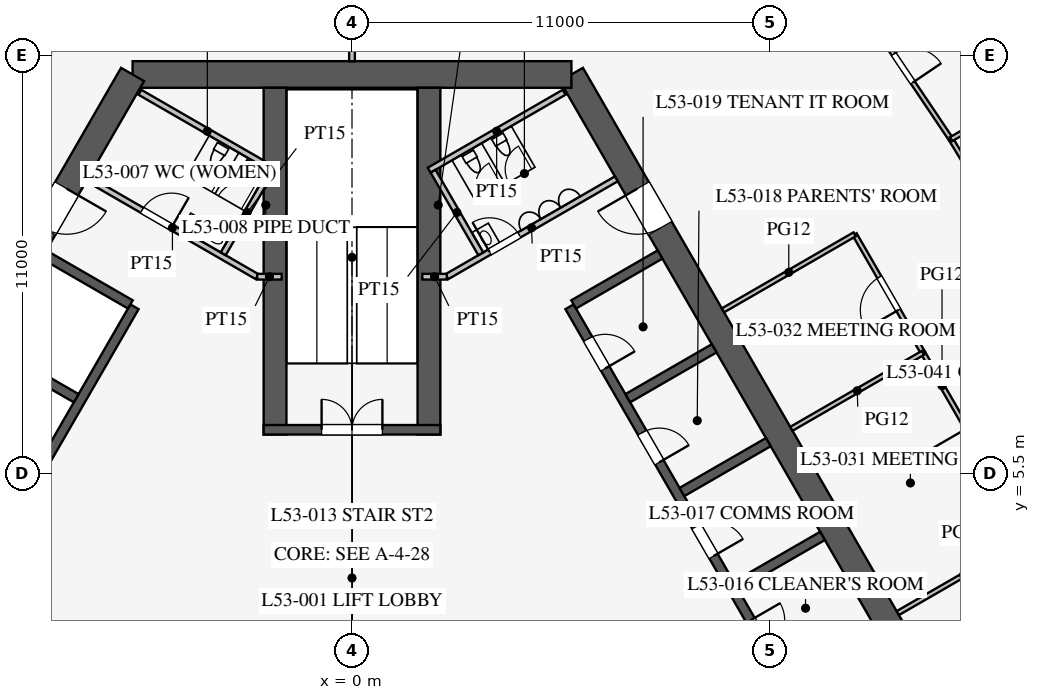
"""IFC4 building model, lengths in metres.
Left out: names, types, materials, properties, quantities, classifications, styles, units other than length and angle.
Written with IfcOpenShell. Run it as: python <this file> out.ifc"""

import sys

from ifc_helpers import new_model, si_unit, direction, frame, frame_2d, origin, place, context, subcontext, project, spatial, rectangle, extrude, element, fill, save


model = new_model("IFC4")
c1 = context("Model", 3, precision=1e-05, world=origin(), true_north=direction((0.0, 1.0)))
c2 = subcontext(c1, "Body", "Model", "MODEL_VIEW")
j1 = project(units=[si_unit("LENGTHUNIT", "METRE"), si_unit("PLANEANGLEUNIT", "RADIAN")], contexts=[c1])
p1 = place(None, origin())
s1 = spatial("IfcSite", under=j1, at=p1, CompositionType="ELEMENT")
p2 = place(p1, origin())
s2 = spatial("IfcBuilding", under=s1, at=p2, CompositionType="ELEMENT")
p3 = place(p2, frame((0.0, 0.0, 231.7)))
s3 = spatial("IfcBuildingStorey", under=s2, at=p3, CompositionType="ELEMENT", Elevation=231.7)
p4 = place(p3, frame((16.743, -3.0, 0.0), z_axis=(0.0, 0.0, 1.0), x_axis=(-0.500002442456, 0.866023993627, 0.0)))
e1 = element("IfcWall", 1, at=p4, inside=s3, PredefinedType="SHEAR", context=c2, shape_type="SweptSolid", body=[
    extrude(rectangle(XDim=21.939, YDim=0.7, at=frame_2d((10.97, 0.0))), origin(), (0.0, 0.0, 1.0), 4.2),
])
p5 = place(p4, frame((17.27, 0.0, 0.0)))
e2 = element("IfcOpeningElement", 2, at=p5, cuts=e1, PredefinedType="OPENING", context=c2, shape_type="SweptSolid", body=[
    extrude(rectangle(XDim=1.2, YDim=2.1, at=frame_2d((0.6, 1.05))), frame((0.0, 0.36, 0.0), z_axis=(0.0, -1.0, 0.0), x_axis=(1.0, 0.0, 0.0)), (0.0, 0.0, 1.0), 0.72),
])
p6 = place(p4, frame((3.47, 0.0, 0.0)))
e3 = element("IfcOpeningElement", 3, at=p6, cuts=e1, PredefinedType="OPENING", context=c2, shape_type="SweptSolid", body=[
    extrude(rectangle(XDim=1.2, YDim=2.1, at=frame_2d((0.6, 1.05))), frame((0.0, 0.36, 0.0), z_axis=(0.0, -1.0, 0.0), x_axis=(1.0, 0.0, 0.0)), (0.0, 0.0, 1.0), 0.72),
])
p7 = place(p3, frame((5.773, 16.0, 0.0), z_axis=(0.0, 0.0, 1.0), x_axis=(-1.0, 0.0, 0.0)))
e4 = element("IfcWall", 4, at=p7, inside=s3, PredefinedType="SHEAR", context=c2, shape_type="SweptSolid", body=[
    extrude(rectangle(XDim=11.547, YDim=0.7, at=frame_2d((5.773, 0.0))), origin(), (0.0, 0.0, 1.0), 4.2),
])
p8 = place(p3, frame((-5.773, 16.0, 0.0), z_axis=(0.0, 0.0, 1.0), x_axis=(-0.500002442456, -0.866023993627, 0.0)))
e5 = element("IfcWall", 5, at=p8, inside=s3, PredefinedType="SHEAR", context=c2, shape_type="SweptSolid", body=[
    extrude(rectangle(XDim=21.939, YDim=0.7, at=frame_2d((10.97, 0.0))), origin(), (0.0, 0.0, 1.0), 4.2),
])
p9 = place(p8, frame((17.27, 0.0, 0.0)))
e6 = element("IfcOpeningElement", 6, at=p9, cuts=e5, PredefinedType="OPENING", context=c2, shape_type="SweptSolid", body=[
    extrude(rectangle(XDim=1.2, YDim=2.1, at=frame_2d((0.6, 1.05))), frame((0.0, 0.36, 0.0), z_axis=(0.0, -1.0, 0.0), x_axis=(1.0, 0.0, 0.0)), (0.0, 0.0, 1.0), 0.72),
])
p10 = place(p8, frame((3.47, 0.0, 0.0)))
e7 = element("IfcOpeningElement", 7, at=p10, cuts=e5, PredefinedType="OPENING", context=c2, shape_type="SweptSolid", body=[
    extrude(rectangle(XDim=1.2, YDim=2.1, at=frame_2d((0.6, 1.05))), frame((0.0, 0.36, 0.0), z_axis=(0.0, -1.0, 0.0), x_axis=(1.0, 0.0, 0.0)), (0.0, 0.0, 1.0), 0.72),
])
p11 = place(p3, frame((11.424, 0.014, 0.0), z_axis=(0.0, 0.0, 1.0), x_axis=(-0.500001763848, 0.866024385424, 0.0)))
e8 = element("IfcWall", 8, at=p11, inside=s3, PredefinedType="SHEAR", context=c2, shape_type="SweptSolid", body=[
    extrude(rectangle(XDim=11.4, YDim=0.25, at=frame_2d((5.7, 0.0))), origin(), (0.0, 0.0, 1.0), 4.2),
])
p12 = place(p11, frame((0.975, 0.0, 0.0)))
e9 = element("IfcOpeningElement", 9, at=p12, cuts=e8, PredefinedType="OPENING", context=c2, shape_type="SweptSolid", body=[
    extrude(rectangle(XDim=0.9, YDim=2.1, at=frame_2d((0.45, 1.05))), frame((0.0, 0.135, 0.0), z_axis=(0.0, -1.0, 0.0), x_axis=(1.0, 0.0, 0.0)), (0.0, 0.0, 1.0), 0.27),
])
p13 = place(p11, frame((3.825, 0.0, 0.0)))
e10 = element("IfcOpeningElement", 10, at=p13, cuts=e8, PredefinedType="OPENING", context=c2, shape_type="SweptSolid", body=[
    extrude(rectangle(XDim=0.9, YDim=2.1, at=frame_2d((0.45, 1.05))), frame((0.0, 0.135, 0.0), z_axis=(0.0, -1.0, 0.0), x_axis=(1.0, 0.0, 0.0)), (0.0, 0.0, 1.0), 0.27),
])
p14 = place(p11, frame((6.675, 0.0, 0.0)))
e11 = element("IfcOpeningElement", 11, at=p14, cuts=e8, PredefinedType="OPENING", context=c2, shape_type="SweptSolid", body=[
    extrude(rectangle(XDim=0.9, YDim=2.1, at=frame_2d((0.45, 1.05))), frame((0.0, 0.135, 0.0), z_axis=(0.0, -1.0, 0.0), x_axis=(1.0, 0.0, 0.0)), (0.0, 0.0, 1.0), 0.27),
])
p15 = place(p11, frame((9.525, 0.0, 0.0)))
e12 = element("IfcOpeningElement", 12, at=p15, cuts=e8, PredefinedType="OPENING", context=c2, shape_type="SweptSolid", body=[
    extrude(rectangle(XDim=0.9, YDim=2.1, at=frame_2d((0.45, 1.05))), frame((0.0, 0.135, 0.0), z_axis=(0.0, -1.0, 0.0), x_axis=(1.0, 0.0, 0.0)), (0.0, 0.0, 1.0), 0.27),
])
for number, where, z_axis, x_axis in (
    (13, (10.107, 2.544, 0.0), (0.0, 0.0, 1.0), (0.866, 0.5, 0.0)),
    (14, (8.682, 5.012, 0.0), (0.0, 0.0, 1.0), (0.866, 0.5, 0.0)),
    (15, (7.257, 7.481, 0.0), (0.0, 0.0, 1.0), (0.866, 0.5, 0.0)),
    (16, (5.832, 9.949, 0.0), (0.0, 0.0, 1.0), (0.866, 0.5, 0.0)),
):
    element("IfcWall", number, at=place(p3, frame(where, z_axis=z_axis, x_axis=x_axis)), inside=s3, PredefinedType="SHEAR", context=c2, shape_type="SweptSolid", body=[
        extrude(rectangle(XDim=2.625, YDim=0.25, at=frame_2d((1.312, 0.0))), origin(), (0.0, 0.0, 1.0), 4.2),
    ])
p16 = place(p3, frame((-5.724, 9.886, 0.0), z_axis=(0.0, 0.0, 1.0), x_axis=(-0.500001763848, -0.866024385424, 0.0)))
e17 = element("IfcWall", 17, at=p16, inside=s3, PredefinedType="SHEAR", context=c2, shape_type="SweptSolid", body=[
    extrude(rectangle(XDim=11.4, YDim=0.25, at=frame_2d((5.7, 0.0))), origin(), (0.0, 0.0, 1.0), 4.2),
])
p17 = place(p16, frame((6.525, 0.0, 0.0)))
e18 = element("IfcOpeningElement", 18, at=p17, cuts=e17, PredefinedType="OPENING", context=c2, shape_type="SweptSolid", body=[
    extrude(rectangle(XDim=1.2, YDim=2.2, at=frame_2d((0.6, 1.1))), frame((0.0, 0.135, 0.0), z_axis=(0.0, -1.0, 0.0), x_axis=(1.0, 0.0, 0.0)), (0.0, 0.0, 1.0), 0.27),
])
p18 = place(p16, frame((9.375, 0.0, 0.0)))
e19 = element("IfcOpeningElement", 19, at=p18, cuts=e17, PredefinedType="OPENING", context=c2, shape_type="SweptSolid", body=[
    extrude(rectangle(XDim=1.2, YDim=2.2, at=frame_2d((0.6, 1.1))), frame((0.0, 0.135, 0.0), z_axis=(0.0, -1.0, 0.0), x_axis=(1.0, 0.0, 0.0)), (0.0, 0.0, 1.0), 0.27),
])
for number, where, z_axis, x_axis in (
    (20, (-5.832, 9.949, 0.0), (0.0, 0.0, 1.0), (-0.866, 0.5, 0.0)),
    (21, (-7.257, 7.481, 0.0), (0.0, 0.0, 1.0), (-0.866, 0.5, 0.0)),
):
    element("IfcWall", number, at=place(p3, frame(where, z_axis=z_axis, x_axis=x_axis)), inside=s3, PredefinedType="SHEAR", context=c2, shape_type="SweptSolid", body=[
        extrude(rectangle(XDim=2.625, YDim=0.25, at=frame_2d((1.312, 0.0))), origin(), (0.0, 0.0, 1.0), 4.2),
    ])
for number, where, z_axis, x_axis in (
    (22, (2.025, 6.525, 0.0), (0.0, 0.0, 1.0), (0.0, 1.0, 0.0)),
    (23, (-2.025, 6.525, 0.0), (0.0, 0.0, 1.0), (0.0, 1.0, 0.0)),
):
    element("IfcWall", number, at=place(p3, frame(where, z_axis=z_axis, x_axis=x_axis)), inside=s3, PredefinedType="SHEAR", context=c2, shape_type="SweptSolid", body=[
        extrude(rectangle(XDim=9.125, YDim=0.6, at=frame_2d((4.562, 0.0))), origin(), (0.0, 0.0, 1.0), 4.2),
    ])
p19 = place(p3, frame((2.325, 6.65, 0.0), z_axis=(0.0, 0.0, 1.0), x_axis=(-1.0, 0.0, 0.0)))
e24 = element("IfcWall", 24, at=p19, inside=s3, PredefinedType="SHEAR", context=c2, shape_type="SweptSolid", body=[
    extrude(rectangle(XDim=4.65, YDim=0.25, at=frame_2d((2.325, 0.0))), origin(), (0.0, 0.0, 1.0), 4.2),
])
p20 = place(p19, frame((1.525, 0.0, 0.0)))
e25 = element("IfcOpeningElement", 25, at=p20, cuts=e24, PredefinedType="OPENING", context=c2, shape_type="SweptSolid", body=[
    extrude(rectangle(XDim=1.6, YDim=2.1, at=frame_2d((0.8, 1.05))), frame((0.0, 0.135, 0.0), z_axis=(0.0, -1.0, 0.0), x_axis=(1.0, 0.0, 0.0)), (0.0, 0.0, 1.0), 0.27),
])
p21 = place(p3, frame((2.495, 10.678, 0.0), z_axis=(0.0, 0.0, 1.0), x_axis=(0.866037967349, 0.499978238636, 0.0)))
e26 = element("IfcWall", 26, at=p21, inside=s3, PredefinedType="PARTITIONING", context=c2, shape_type="SweptSolid", body=[
    extrude(rectangle(XDim=5.15, YDim=0.15, at=frame_2d((2.575, 0.0))), origin(), (0.0, 0.0, 1.0), 4.0),
])
p22 = place(p21, frame((1.3, 0.0, 0.0)))
e27 = element("IfcOpeningElement", 27, at=p22, cuts=e26, PredefinedType="OPENING", context=c2, shape_type="SweptSolid", body=[
    extrude(rectangle(XDim=0.9, YDim=2.1, at=frame_2d((0.45, 1.05))), frame((0.0, 0.085, 0.0), z_axis=(0.0, -1.0, 0.0), x_axis=(1.0, 0.0, 0.0)), (0.0, 0.0, 1.0), 0.17),
])
p23 = place(p3, frame((-2.495, 10.678, 0.0), z_axis=(0.0, 0.0, 1.0), x_axis=(-0.866037967349, 0.499978238636, 0.0)))
e28 = element("IfcWall", 28, at=p23, inside=s3, PredefinedType="PARTITIONING", context=c2, shape_type="SweptSolid", body=[
    extrude(rectangle(XDim=5.15, YDim=0.15, at=frame_2d((2.575, 0.0))), origin(), (0.0, 0.0, 1.0), 4.0),
])
p24 = place(p23, frame((2.6, 0.0, 0.0)))
e29 = element("IfcOpeningElement", 29, at=p24, cuts=e28, PredefinedType="OPENING", context=c2, shape_type="SweptSolid", body=[
    extrude(rectangle(XDim=0.9, YDim=2.1, at=frame_2d((0.45, 1.05))), frame((0.0, 0.085, 0.0), z_axis=(0.0, -1.0, 0.0), x_axis=(1.0, 0.0, 0.0)), (0.0, 0.0, 1.0), 0.17),
])
for number, where, z_axis, x_axis in (
    (30, (2.495, 10.678, 0.0), (0.0, 0.0, 1.0), (-1.0, 0.0, 0.0)),
    (31, (-2.495, 10.678, 0.0), (0.0, 0.0, 1.0), (1.0, 0.0, 0.0)),
):
    element("IfcWall", number, at=place(p3, frame(where, z_axis=z_axis, x_axis=x_axis)), inside=s3, PredefinedType="PARTITIONING", context=c2, shape_type="SweptSolid", body=[
        extrude(rectangle(XDim=0.645, YDim=0.15, at=frame_2d((0.323, 0.0))), origin(), (0.0, 0.0, 1.0), 4.0),
    ])
p25 = place(p3, frame((2.031, 13.482, 0.0), z_axis=(0.0, 0.0, 1.0), x_axis=(0.866050731258, 0.499956128963, 0.0)))
e32 = element("IfcWall", 32, at=p25, inside=s3, PredefinedType="PARTITIONING", context=c2, shape_type="SweptSolid", body=[
    extrude(rectangle(XDim=4.1, YDim=0.15, at=frame_2d((2.05, 0.0))), origin(), (0.0, 0.0, 1.0), 4.0),
])
p26 = place(p3, frame((3.389, 11.281, 0.0), z_axis=(0.0, 0.0, 1.0), x_axis=(-0.499989096993, 0.866031698547, 0.0)))
e33 = element("IfcWall", 33, at=p26, inside=s3, PredefinedType="PARTITIONING", context=c2, shape_type="SweptSolid", body=[
    extrude(rectangle(XDim=2.51, YDim=0.15, at=frame_2d((1.255, 0.0))), origin(), (0.0, 0.0, 1.0), 4.0),
])
p27 = place(p3, frame((-2.031, 13.482, 0.0), z_axis=(0.0, 0.0, 1.0), x_axis=(-0.866050731258, 0.499956128963, 0.0)))
e34 = element("IfcWall", 34, at=p27, inside=s3, PredefinedType="PARTITIONING", context=c2, shape_type="SweptSolid", body=[
    extrude(rectangle(XDim=4.1, YDim=0.15, at=frame_2d((2.05, 0.0))), origin(), (0.0, 0.0, 1.0), 4.0),
])
p28 = place(p3, frame((-3.389, 11.281, 0.0), z_axis=(0.0, 0.0, 1.0), x_axis=(0.499989096993, 0.866031698547, 0.0)))
e35 = element("IfcWall", 35, at=p28, inside=s3, PredefinedType="PARTITIONING", context=c2, shape_type="SweptSolid", body=[
    extrude(rectangle(XDim=2.51, YDim=0.15, at=frame_2d((1.255, 0.0))), origin(), (0.0, 0.0, 1.0), 4.0),
])
p29 = place(p3, frame((0.0, 16.35, 0.0), z_axis=(0.0, 0.0, 1.0), x_axis=(0.0, 1.0, 0.0)))
e36 = element("IfcWall", 36, at=p29, inside=s3, PredefinedType="PARTITIONING", context=c2, shape_type="SweptSolid", body=[
    extrude(rectangle(XDim=15.0, YDim=0.15, at=frame_2d((7.5, 0.0))), origin(), (0.0, 0.0, 1.0), 2.4),
])
p30 = place(p3, frame((15.026, 8.675, 0.0), z_axis=(0.0, 0.0, 1.0), x_axis=(-0.500012057535, 0.866018442252, 0.0)))
e37 = element("IfcWall", 37, at=p30, inside=s3, PredefinedType="PARTITIONING", context=c2, shape_type="SweptSolid", body=[
    extrude(rectangle(XDim=3.6, YDim=0.12, at=frame_2d((1.8, 0.0))), origin(), (0.0, 0.0, 1.0), 2.9),
])
p31 = place(p30, frame((1.3, 0.0, 0.15)))
e38 = element("IfcOpeningElement", 38, at=p31, cuts=e37, PredefinedType="OPENING", context=c2, shape_type="SweptSolid", body=[
    extrude(rectangle(XDim=1.0, YDim=2.1, at=frame_2d((0.5, 1.05))), frame((0.0, 0.07, 0.0), z_axis=(0.0, -1.0, 0.0), x_axis=(1.0, 0.0, 0.0)), (0.0, 0.0, 1.0), 0.14),
])
p32 = place(p3, frame((17.825, 3.825, 0.0), z_axis=(0.0, 0.0, 1.0), x_axis=(-0.499965239061, 0.866045472092, 0.0)))
e39 = element("IfcWall", 39, at=p32, inside=s3, PredefinedType="PARTITIONING", context=c2, shape_type="SweptSolid", body=[
    extrude(rectangle(XDim=5.6, YDim=0.12, at=frame_2d((2.8, 0.0))), origin(), (0.0, 0.0, 1.0), 2.9),
])
p33 = place(p32, frame((2.3, 0.0, 0.15)))
e40 = element("IfcOpeningElement", 40, at=p33, cuts=e39, PredefinedType="OPENING", context=c2, shape_type="SweptSolid", body=[
    extrude(rectangle(XDim=1.0, YDim=2.1, at=frame_2d((0.5, 1.05))), frame((0.0, 0.07, 0.0), z_axis=(0.0, -1.0, 0.0), x_axis=(1.0, 0.0, 0.0)), (0.0, 0.0, 1.0), 0.14),
])
for number, where, z_axis, x_axis in (
    (41, (9.761, 9.793, 0.0), (0.0, 0.0, 1.0), (0.866, 0.5, 0.0)),
    (42, (11.562, 6.675, 0.0), (0.0, 0.0, 1.0), (0.866, 0.5, 0.0)),
    (43, (14.361, 1.825, 0.0), (0.0, 0.0, 1.0), (0.866, 0.5, 0.0)),
):
    element("IfcWall", number, at=place(p3, frame(where, z_axis=z_axis, x_axis=x_axis)), inside=s3, PredefinedType="PARTITIONING", context=c2, shape_type="SweptSolid", body=[
        extrude(rectangle(XDim=4.0, YDim=0.12, at=frame_2d((2.0, 0.0))), origin(), (0.0, 0.0, 1.0), 2.9),
    ])
p34 = place(p3, frame((18.101, 10.45, 0.0), z_axis=(0.0, 0.0, 1.0), x_axis=(-0.519790350351, 0.85429385558, 0.0)))
e44 = element("IfcWall", 44, at=p34, inside=s3, PredefinedType="PARTITIONING", context=c2, shape_type="SweptSolid", body=[
    extrude(rectangle(XDim=4.501, YDim=0.12, at=frame_2d((2.25, 0.0))), origin(), (0.0, 0.0, 1.0), 2.9),
])
p35 = place(p34, frame((1.8, 0.0, 0.15)))
e45 = element("IfcOpeningElement", 45, at=p35, cuts=e44, PredefinedType="OPENING", context=c2, shape_type="SweptSolid", body=[
    extrude(rectangle(XDim=0.9, YDim=2.1, at=frame_2d((0.45, 1.05))), frame((0.0, 0.07, 0.0), z_axis=(0.0, -1.0, 0.0), x_axis=(1.0, 0.0, 0.0)), (0.0, 0.0, 1.0), 0.14),
])
p36 = place(p3, frame((15.761, 14.296, 0.0), z_axis=(0.0, 0.0, 1.0), x_axis=(-0.55850386778, 0.829501916619, 0.0)))
e46 = element("IfcWall", 46, at=p36, inside=s3, PredefinedType="PARTITIONING", context=c2, shape_type="SweptSolid", body=[
    extrude(rectangle(XDim=4.511, YDim=0.12, at=frame_2d((2.255, 0.0))), origin(), (0.0, 0.0, 1.0), 2.9),
])
p37 = place(p36, frame((1.8, 0.0, 0.15)))
e47 = element("IfcOpeningElement", 47, at=p37, cuts=e46, PredefinedType="OPENING", context=c2, shape_type="SweptSolid", body=[
    extrude(rectangle(XDim=0.9, YDim=2.1, at=frame_2d((0.45, 1.05))), frame((0.0, 0.07, 0.0), z_axis=(0.0, -1.0, 0.0), x_axis=(1.0, 0.0, 0.0)), (0.0, 0.0, 1.0), 0.14),
])
p38 = place(p3, frame((15.761, 14.296, 0.0), z_axis=(0.0, 0.0, 1.0), x_axis=(0.866022596503, 0.500004862322, 0.0)))
e48 = element("IfcWall", 48, at=p38, inside=s3, PredefinedType="PARTITIONING", context=c2, shape_type="SweptSolid", body=[
    extrude(rectangle(XDim=2.894, YDim=0.12, at=frame_2d((1.447, 0.0))), origin(), (0.0, 0.0, 1.0), 2.9),
])
p39 = place(p3, frame((-0.016, 30.392, 0.0), z_axis=(0.0, 0.0, 1.0), x_axis=(-0.500000626146, -0.866025042278, 0.0)))
e49 = element("IfcWall", 49, at=p39, inside=s3, PredefinedType="PARTITIONING", context=c2, shape_type="SweptSolid", body=[
    extrude(rectangle(XDim=52.624, YDim=0.12, at=frame_2d((26.312, 0.0))), origin(), (0.0, 0.0, 1.0), 2.9),
])
p40 = place(p39, frame((10.15, 0.0, 0.15)))
e50 = element("IfcOpeningElement", 50, at=p40, cuts=e49, PredefinedType="OPENING", context=c2, shape_type="SweptSolid", body=[
    extrude(rectangle(XDim=1.8, YDim=2.1, at=frame_2d((0.9, 1.05))), frame((0.0, 0.07, 0.0), z_axis=(0.0, -1.0, 0.0), x_axis=(1.0, 0.0, 0.0)), (0.0, 0.0, 1.0), 0.14),
])
p41 = place(p39, frame((40.65, 0.0, 0.15)))
e51 = element("IfcOpeningElement", 51, at=p41, cuts=e49, PredefinedType="OPENING", context=c2, shape_type="SweptSolid", body=[
    extrude(rectangle(XDim=1.8, YDim=2.1, at=frame_2d((0.9, 1.05))), frame((0.0, 0.07, 0.0), z_axis=(0.0, -1.0, 0.0), x_axis=(1.0, 0.0, 0.0)), (0.0, 0.0, 1.0), 0.14),
])
p42 = place(p22, origin())
e52 = element("IfcDoor", 52, at=p42, inside=s3, OperationType="SINGLE_SWING_LEFT", PredefinedType="DOOR", context=c2, shape_type="SweptSolid", body=[
    extrude(rectangle(XDim=0.9, YDim=2.1, at=frame_2d((0.45, 1.05))), frame((0.0, 0.025, 0.0), z_axis=(0.0, -1.0, 0.0), x_axis=(1.0, 0.0, 0.0)), (0.0, 0.0, 1.0), 0.05),
])
fill(e27, e52)
p43 = place(p24, frame((0.9, 0.0, 0.0), z_axis=(0.0, 0.0, 1.0), x_axis=(-1.0, 0.0, 0.0)))
e53 = element("IfcDoor", 53, at=p43, inside=s3, OperationType="SINGLE_SWING_RIGHT", PredefinedType="DOOR", context=c2, shape_type="SweptSolid", body=[
    extrude(rectangle(XDim=0.9, YDim=2.1, at=frame_2d((0.45, 1.05))), frame((0.0, 0.025, 0.0), z_axis=(0.0, -1.0, 0.0), x_axis=(1.0, 0.0, 0.0)), (0.0, 0.0, 1.0), 0.05),
])
fill(e29, e53)
p44 = place(p20, frame((1.6, 0.0, 0.0), z_axis=(0.0, 0.0, 1.0), x_axis=(-1.0, 0.0, 0.0)))
e54 = element("IfcDoor", 54, at=p44, inside=s3, OperationType="DOUBLE_DOOR_SINGLE_SWING", PredefinedType="DOOR", context=c2, shape_type="SweptSolid", body=[
    extrude(rectangle(XDim=1.6, YDim=2.1, at=frame_2d((0.8, 1.05))), frame((0.0, 0.025, 0.0), z_axis=(0.0, -1.0, 0.0), x_axis=(1.0, 0.0, 0.0)), (0.0, 0.0, 1.0), 0.05),
])
fill(e25, e54)
p45 = place(p5, origin())
e55 = element("IfcDoor", 55, at=p45, inside=s3, OperationType="SINGLE_SWING_RIGHT", PredefinedType="DOOR", context=c2, shape_type="SweptSolid", body=[
    extrude(rectangle(XDim=1.2, YDim=2.1, at=frame_2d((0.6, 1.05))), frame((0.0, 0.025, 0.0), z_axis=(0.0, -1.0, 0.0), x_axis=(1.0, 0.0, 0.0)), (0.0, 0.0, 1.0), 0.05),
])
fill(e2, e55)
p46 = place(p10, origin())
e56 = element("IfcDoor", 56, at=p46, inside=s3, OperationType="SINGLE_SWING_LEFT", PredefinedType="DOOR", context=c2, shape_type="SweptSolid", body=[
    extrude(rectangle(XDim=1.2, YDim=2.1, at=frame_2d((0.6, 1.05))), frame((0.0, 0.025, 0.0), z_axis=(0.0, -1.0, 0.0), x_axis=(1.0, 0.0, 0.0)), (0.0, 0.0, 1.0), 0.05),
])
fill(e7, e56)
p47 = place(p13, frame((0.9, 0.0, 0.0), z_axis=(0.0, 0.0, 1.0), x_axis=(-1.0, 0.0, 0.0)))
e57 = element("IfcDoor", 57, at=p47, inside=s3, OperationType="SINGLE_SWING_RIGHT", PredefinedType="DOOR", context=c2, shape_type="SweptSolid", body=[
    extrude(rectangle(XDim=0.9, YDim=2.1, at=frame_2d((0.45, 1.05))), frame((0.0, 0.025, 0.0), z_axis=(0.0, -1.0, 0.0), x_axis=(1.0, 0.0, 0.0)), (0.0, 0.0, 1.0), 0.05),
])
fill(e10, e57)
p48 = place(p14, frame((0.9, 0.0, 0.0), z_axis=(0.0, 0.0, 1.0), x_axis=(-1.0, 0.0, 0.0)))
e58 = element("IfcDoor", 58, at=p48, inside=s3, OperationType="SINGLE_SWING_RIGHT", PredefinedType="DOOR", context=c2, shape_type="SweptSolid", body=[
    extrude(rectangle(XDim=0.9, YDim=2.1, at=frame_2d((0.45, 1.05))), frame((0.0, 0.025, 0.0), z_axis=(0.0, -1.0, 0.0), x_axis=(1.0, 0.0, 0.0)), (0.0, 0.0, 1.0), 0.05),
])
fill(e11, e58)
p49 = place(p15, frame((0.9, 0.0, 0.0), z_axis=(0.0, 0.0, 1.0), x_axis=(-1.0, 0.0, 0.0)))
e59 = element("IfcDoor", 59, at=p49, inside=s3, OperationType="SINGLE_SWING_RIGHT", PredefinedType="DOOR", context=c2, shape_type="SweptSolid", body=[
    extrude(rectangle(XDim=0.9, YDim=2.1, at=frame_2d((0.45, 1.05))), frame((0.0, 0.025, 0.0), z_axis=(0.0, -1.0, 0.0), x_axis=(1.0, 0.0, 0.0)), (0.0, 0.0, 1.0), 0.05),
])
fill(e12, e59)
p50 = place(p31, origin())
e60 = element("IfcDoor", 60, at=p50, inside=s3, OperationType="SINGLE_SWING_LEFT", PredefinedType="DOOR", context=c2, shape_type="SweptSolid", body=[
    extrude(rectangle(XDim=1.0, YDim=2.1, at=frame_2d((0.5, 1.05))), frame((0.0, 0.025, 0.0), z_axis=(0.0, -1.0, 0.0), x_axis=(1.0, 0.0, 0.0)), (0.0, 0.0, 1.0), 0.05),
])
fill(e38, e60)
p51 = place(p37, frame((0.9, 0.0, 0.0), z_axis=(0.0, 0.0, 1.0), x_axis=(-1.0, 0.0, 0.0)))
e61 = element("IfcDoor", 61, at=p51, inside=s3, OperationType="SINGLE_SWING_RIGHT", PredefinedType="DOOR", context=c2, shape_type="SweptSolid", body=[
    extrude(rectangle(XDim=0.9, YDim=2.1, at=frame_2d((0.45, 1.05))), frame((0.0, 0.025, 0.0), z_axis=(0.0, -1.0, 0.0), x_axis=(1.0, 0.0, 0.0)), (0.0, 0.0, 1.0), 0.05),
])
fill(e47, e61)
save(model, sys.argv[1])
